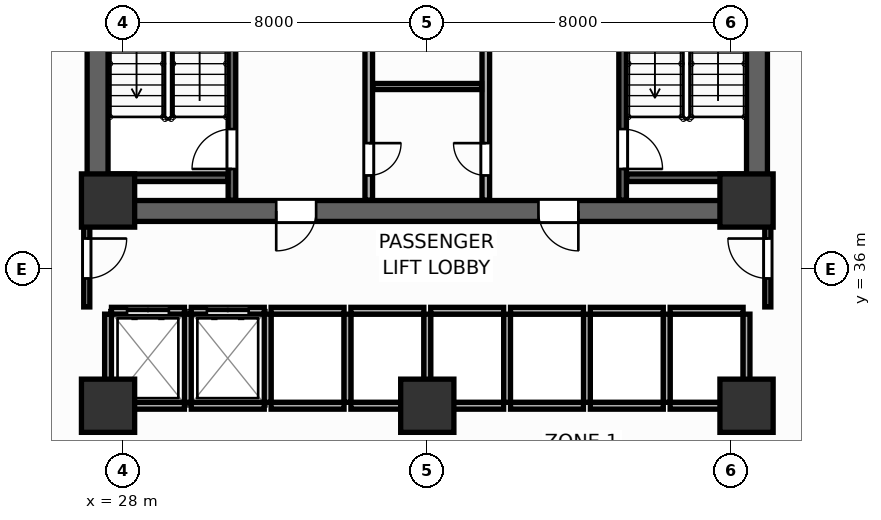
"""IFC4 building model, lengths in metres.
Left out: names, types, materials, properties, quantities, classifications, styles, units other than length and angle.
Written with IfcOpenShell. Run it as: python <this file> out.ifc"""

import sys

from ifc_helpers import new_model, si_unit, direction, frame, frame_2d, origin, origin_2d, place, context, subcontext, project, spatial, rectangle, extrude, source, transform, mapped, element, fill, save


model = new_model("IFC4")
c1 = context("Model", 3, precision=1e-05, world=origin(), true_north=direction((0.0, 1.0)))
c2 = subcontext(c1, "Body", "Model", "MODEL_VIEW")
j1 = project(units=[si_unit("LENGTHUNIT", "METRE"), si_unit("PLANEANGLEUNIT", "RADIAN")], contexts=[c1])
p1 = place(None, origin())
s1 = spatial("IfcSite", under=j1, at=p1, CompositionType="ELEMENT")
p2 = place(p1, origin())
s2 = spatial("IfcBuilding", under=s1, at=p2, CompositionType="ELEMENT")
p3 = place(p2, frame((0.0, 0.0, 63.9)))
s3 = spatial("IfcBuildingStorey", under=s2, at=p3, CompositionType="ELEMENT", Elevation=63.9)
p4 = place(p3, frame((27.05, 37.525, 0.0), z_axis=(0.0, 0.0, 1.0), x_axis=(1.0, 0.0, 0.0)))
e1 = element("IfcWall", 1, at=p4, inside=s3, PredefinedType="SHEAR", context=c2, shape_type="SweptSolid", body=[
    extrude(rectangle(XDim=17.9, YDim=0.55, at=frame_2d((8.95, 0.0))), origin(), (0.0, 0.0, 1.0), 3.9),
])
p5 = place(p4, frame((4.975, 0.0, 0.0)))
e2 = element("IfcOpeningElement", 2, at=p5, cuts=e1, PredefinedType="OPENING", context=c2, shape_type="SweptSolid", body=[
    extrude(rectangle(XDim=1.05, YDim=2.1, at=frame_2d((0.525, 1.05))), frame((0.0, 0.285, 0.0), z_axis=(0.0, -1.0, 0.0), x_axis=(1.0, 0.0, 0.0)), (0.0, 0.0, 1.0), 0.57),
])
p6 = place(p4, frame((11.875, 0.0, 0.0)))
e3 = element("IfcOpeningElement", 3, at=p6, cuts=e1, PredefinedType="OPENING", context=c2, shape_type="SweptSolid", body=[
    extrude(rectangle(XDim=1.05, YDim=2.1, at=frame_2d((0.525, 1.05))), frame((0.0, 0.285, 0.0), z_axis=(0.0, -1.0, 0.0), x_axis=(1.0, 0.0, 0.0)), (0.0, 0.0, 1.0), 0.57),
])
for number, where, z_axis, x_axis in (
    (4, (27.325, 37.8, 0.0), (0.0, 0.0, 1.0), (0.0, 1.0, 0.0)),
    (5, (44.675, 37.8, 0.0), (0.0, 0.0, 1.0), (0.0, 1.0, 0.0)),
):
    element("IfcWall", number, at=place(p3, frame(where, z_axis=z_axis, x_axis=x_axis)), inside=s3, PredefinedType="SHEAR", context=c2, shape_type="SweptSolid", body=[
        extrude(rectangle(XDim=9.0, YDim=0.55, at=frame_2d((4.5, 0.0))), origin(), (0.0, 0.0, 1.0), 3.9),
    ])
m1 = source(origin(), c2, "Body", "SweptSolid", [
    extrude(rectangle(XDim=1.4, YDim=1.4, at=origin_2d()), origin(), (0.0, 0.0, 1.0), 3.9),
])
for number, where, z_axis, x_axis in (
    (6, (27.6, 37.8, 0.0), (0.0, 0.0, 1.0), (1.0, 0.0, 0.0)),
    (7, (44.4, 37.8, 0.0), (0.0, 0.0, 1.0), (1.0, 0.0, 0.0)),
    (8, (27.6, 32.4, 0.0), (0.0, 0.0, 1.0), (1.0, 0.0, 0.0)),
    (9, (44.4, 32.4, 0.0), (0.0, 0.0, 1.0), (1.0, 0.0, 0.0)),
    (10, (36.0, 32.4, 0.0), (0.0, 0.0, 1.0), (1.0, 0.0, 0.0)),
):
    element("IfcColumn", number, at=place(p3, frame(where, z_axis=z_axis, x_axis=x_axis)), inside=s3, PredefinedType="COLUMN", context=c2, shape_type="MappedRepresentation", body=[
        mapped(m1, transform((0.0, 0.0, 0.0), scale=1.0)),
    ])
p7 = place(p3, frame((30.86, 37.81, 0.0), z_axis=(0.0, 0.0, 1.0), x_axis=(0.0, 1.0, 0.0)))
e11 = element("IfcWall", 11, at=p7, inside=s3, PredefinedType="SHEAR", context=c2, shape_type="SweptSolid", body=[
    extrude(rectangle(XDim=8.98, YDim=0.2, at=frame_2d((4.49, 0.0))), origin(), (0.0, 0.0, 1.0), 3.9),
])
p8 = place(p7, frame((0.82, 0.0, 0.0)))
e12 = element("IfcOpeningElement", 12, at=p8, cuts=e11, PredefinedType="OPENING", context=c2, shape_type="SweptSolid", body=[
    extrude(rectangle(XDim=1.05, YDim=2.1, at=frame_2d((0.525, 1.05))), frame((0.0, 0.11, 0.0), z_axis=(0.0, -1.0, 0.0), x_axis=(1.0, 0.0, 0.0)), (0.0, 0.0, 1.0), 0.22),
])
p9 = place(p3, frame((27.61, 38.4, 0.0), z_axis=(0.0, 0.0, 1.0), x_axis=(1.0, 0.0, 0.0)))
e13 = element("IfcWall", 13, at=p9, inside=s3, PredefinedType="SHEAR", context=c2, shape_type="SweptSolid", body=[
    extrude(rectangle(XDim=3.14, YDim=0.2, at=frame_2d((1.57, 0.0))), origin(), (0.0, 0.0, 1.0), 3.9),
])
p10 = place(p3, frame((41.14, 37.81, 0.0), z_axis=(0.0, 0.0, 1.0), x_axis=(0.0, 1.0, 0.0)))
e14 = element("IfcWall", 14, at=p10, inside=s3, PredefinedType="SHEAR", context=c2, shape_type="SweptSolid", body=[
    extrude(rectangle(XDim=8.98, YDim=0.2, at=frame_2d((4.49, 0.0))), origin(), (0.0, 0.0, 1.0), 3.9),
])
p11 = place(p10, frame((0.82, 0.0, 0.0)))
e15 = element("IfcOpeningElement", 15, at=p11, cuts=e14, PredefinedType="OPENING", context=c2, shape_type="SweptSolid", body=[
    extrude(rectangle(XDim=1.05, YDim=2.1, at=frame_2d((0.525, 1.05))), frame((0.0, 0.11, 0.0), z_axis=(0.0, -1.0, 0.0), x_axis=(1.0, 0.0, 0.0)), (0.0, 0.0, 1.0), 0.22),
])
p12 = place(p3, frame((41.25, 38.4, 0.0), z_axis=(0.0, 0.0, 1.0), x_axis=(1.0, 0.0, 0.0)))
e16 = element("IfcWall", 16, at=p12, inside=s3, PredefinedType="SHEAR", context=c2, shape_type="SweptSolid", body=[
    extrude(rectangle(XDim=3.14, YDim=0.2, at=frame_2d((1.57, 0.0))), origin(), (0.0, 0.0, 1.0), 3.9),
])
p13 = place(p3, frame((34.46, 37.81, 0.0), z_axis=(0.0, 0.0, 1.0), x_axis=(0.0, 1.0, 0.0)))
e17 = element("IfcWall", 17, at=p13, inside=s3, PredefinedType="PARTITIONING", context=c2, shape_type="SweptSolid", body=[
    extrude(rectangle(XDim=8.98, YDim=0.2, at=frame_2d((4.49, 0.0))), origin(), (0.0, 0.0, 1.0), 3.68),
])
p14 = place(p13, frame((0.65, 0.0, 0.0)))
e18 = element("IfcOpeningElement", 18, at=p14, cuts=e17, PredefinedType="OPENING", context=c2, shape_type="SweptSolid", body=[
    extrude(rectangle(XDim=0.85, YDim=2.05, at=frame_2d((0.425, 1.025))), frame((0.0, 0.11, 0.0), z_axis=(0.0, -1.0, 0.0), x_axis=(1.0, 0.0, 0.0)), (0.0, 0.0, 1.0), 0.22),
])
p15 = place(p3, frame((37.54, 37.81, 0.0), z_axis=(0.0, 0.0, 1.0), x_axis=(0.0, 1.0, 0.0)))
e19 = element("IfcWall", 19, at=p15, inside=s3, PredefinedType="PARTITIONING", context=c2, shape_type="SweptSolid", body=[
    extrude(rectangle(XDim=8.98, YDim=0.2, at=frame_2d((4.49, 0.0))), origin(), (0.0, 0.0, 1.0), 3.68),
])
p16 = place(p15, frame((0.65, 0.0, 0.0)))
e20 = element("IfcOpeningElement", 20, at=p16, cuts=e19, PredefinedType="OPENING", context=c2, shape_type="SweptSolid", body=[
    extrude(rectangle(XDim=0.85, YDim=2.05, at=frame_2d((0.425, 1.025))), frame((0.0, 0.11, 0.0), z_axis=(0.0, -1.0, 0.0), x_axis=(1.0, 0.0, 0.0)), (0.0, 0.0, 1.0), 0.22),
])
p17 = place(p3, frame((34.57, 40.8, 0.0), z_axis=(0.0, 0.0, 1.0), x_axis=(1.0, 0.0, 0.0)))
e21 = element("IfcWall", 21, at=p17, inside=s3, PredefinedType="PARTITIONING", context=c2, shape_type="SweptSolid", body=[
    extrude(rectangle(XDim=2.86, YDim=0.16, at=frame_2d((1.43, 0.0))), origin(), (0.0, 0.0, 1.0), 3.68),
])
p18 = place(p3, frame((27.69, 34.9, 0.0), z_axis=(0.0, 0.0, 1.0), x_axis=(1.0, 0.0, 0.0)))
e22 = element("IfcWall", 22, at=p18, inside=s3, PredefinedType="PARTITIONING", context=c2, shape_type="SweptSolid", body=[
    extrude(rectangle(XDim=1.92, YDim=0.18, at=frame_2d((0.96, 0.0))), origin(), (0.0, 0.0, 1.0), 3.68),
])
p19 = place(p18, frame((0.41, 0.0, 0.0)))
e23 = element("IfcOpeningElement", 23, at=p19, cuts=e22, PredefinedType="OPENING", context=c2, shape_type="SweptSolid", body=[
    extrude(rectangle(XDim=1.1, YDim=2.1, at=frame_2d((0.55, 1.05))), frame((0.0, 0.1, 0.0), z_axis=(0.0, -1.0, 0.0), x_axis=(1.0, 0.0, 0.0)), (0.0, 0.0, 1.0), 0.2),
])
p20 = place(p3, frame((27.69, 32.4, 0.0), z_axis=(0.0, 0.0, 1.0), x_axis=(1.0, 0.0, 0.0)))
e24 = element("IfcWall", 24, at=p20, inside=s3, PredefinedType="PARTITIONING", context=c2, shape_type="SweptSolid", body=[
    extrude(rectangle(XDim=1.92, YDim=0.18, at=frame_2d((0.96, 0.0))), origin(), (0.0, 0.0, 1.0), 3.18),
])
p21 = place(p3, frame((27.6, 32.49, 0.0), z_axis=(0.0, 0.0, 1.0), x_axis=(0.0, 1.0, 0.0)))
e25 = element("IfcWall", 25, at=p21, inside=s3, PredefinedType="PARTITIONING", context=c2, shape_type="SweptSolid", body=[
    extrude(rectangle(XDim=2.32, YDim=0.18, at=frame_2d((1.16, 0.0))), origin(), (0.0, 0.0, 1.0), 3.68),
])
p22 = place(p3, frame((29.79, 34.9, 0.0), z_axis=(0.0, 0.0, 1.0), x_axis=(1.0, 0.0, 0.0)))
e26 = element("IfcWall", 26, at=p22, inside=s3, PredefinedType="PARTITIONING", context=c2, shape_type="SweptSolid", body=[
    extrude(rectangle(XDim=1.92, YDim=0.18, at=frame_2d((0.96, 0.0))), origin(), (0.0, 0.0, 1.0), 3.68),
])
p23 = place(p22, frame((0.41, 0.0, 0.0)))
e27 = element("IfcOpeningElement", 27, at=p23, cuts=e26, PredefinedType="OPENING", context=c2, shape_type="SweptSolid", body=[
    extrude(rectangle(XDim=1.1, YDim=2.1, at=frame_2d((0.55, 1.05))), frame((0.0, 0.1, 0.0), z_axis=(0.0, -1.0, 0.0), x_axis=(1.0, 0.0, 0.0)), (0.0, 0.0, 1.0), 0.2),
])
p24 = place(p3, frame((29.79, 32.4, 0.0), z_axis=(0.0, 0.0, 1.0), x_axis=(1.0, 0.0, 0.0)))
e28 = element("IfcWall", 28, at=p24, inside=s3, PredefinedType="PARTITIONING", context=c2, shape_type="SweptSolid", body=[
    extrude(rectangle(XDim=1.92, YDim=0.18, at=frame_2d((0.96, 0.0))), origin(), (0.0, 0.0, 1.0), 3.18),
])
p25 = place(p3, frame((29.7, 32.49, 0.0), z_axis=(0.0, 0.0, 1.0), x_axis=(0.0, 1.0, 0.0)))
e29 = element("IfcWall", 29, at=p25, inside=s3, PredefinedType="PARTITIONING", context=c2, shape_type="SweptSolid", body=[
    extrude(rectangle(XDim=2.32, YDim=0.18, at=frame_2d((1.16, 0.0))), origin(), (0.0, 0.0, 1.0), 3.68),
])
p26 = place(p3, frame((31.89, 34.9, 0.0), z_axis=(0.0, 0.0, 1.0), x_axis=(1.0, 0.0, 0.0)))
e30 = element("IfcWall", 30, at=p26, inside=s3, PredefinedType="PARTITIONING", context=c2, shape_type="SweptSolid", body=[
    extrude(rectangle(XDim=1.92, YDim=0.18, at=frame_2d((0.96, 0.0))), origin(), (0.0, 0.0, 1.0), 3.68),
])
p27 = place(p3, frame((31.89, 32.4, 0.0), z_axis=(0.0, 0.0, 1.0), x_axis=(1.0, 0.0, 0.0)))
e31 = element("IfcWall", 31, at=p27, inside=s3, PredefinedType="PARTITIONING", context=c2, shape_type="SweptSolid", body=[
    extrude(rectangle(XDim=1.92, YDim=0.18, at=frame_2d((0.96, 0.0))), origin(), (0.0, 0.0, 1.0), 3.18),
])
p28 = place(p3, frame((31.8, 32.49, 0.0), z_axis=(0.0, 0.0, 1.0), x_axis=(0.0, 1.0, 0.0)))
e32 = element("IfcWall", 32, at=p28, inside=s3, PredefinedType="PARTITIONING", context=c2, shape_type="SweptSolid", body=[
    extrude(rectangle(XDim=2.32, YDim=0.18, at=frame_2d((1.16, 0.0))), origin(), (0.0, 0.0, 1.0), 3.68),
])
p29 = place(p3, frame((33.99, 34.9, 0.0), z_axis=(0.0, 0.0, 1.0), x_axis=(1.0, 0.0, 0.0)))
e33 = element("IfcWall", 33, at=p29, inside=s3, PredefinedType="PARTITIONING", context=c2, shape_type="SweptSolid", body=[
    extrude(rectangle(XDim=1.92, YDim=0.18, at=frame_2d((0.96, 0.0))), origin(), (0.0, 0.0, 1.0), 3.68),
])
p30 = place(p3, frame((33.99, 32.4, 0.0), z_axis=(0.0, 0.0, 1.0), x_axis=(1.0, 0.0, 0.0)))
e34 = element("IfcWall", 34, at=p30, inside=s3, PredefinedType="PARTITIONING", context=c2, shape_type="SweptSolid", body=[
    extrude(rectangle(XDim=1.92, YDim=0.18, at=frame_2d((0.96, 0.0))), origin(), (0.0, 0.0, 1.0), 3.18),
])
p31 = place(p3, frame((33.9, 32.49, 0.0), z_axis=(0.0, 0.0, 1.0), x_axis=(0.0, 1.0, 0.0)))
e35 = element("IfcWall", 35, at=p31, inside=s3, PredefinedType="PARTITIONING", context=c2, shape_type="SweptSolid", body=[
    extrude(rectangle(XDim=2.32, YDim=0.18, at=frame_2d((1.16, 0.0))), origin(), (0.0, 0.0, 1.0), 3.68),
])
p32 = place(p3, frame((36.09, 34.9, 0.0), z_axis=(0.0, 0.0, 1.0), x_axis=(1.0, 0.0, 0.0)))
e36 = element("IfcWall", 36, at=p32, inside=s3, PredefinedType="PARTITIONING", context=c2, shape_type="SweptSolid", body=[
    extrude(rectangle(XDim=1.92, YDim=0.18, at=frame_2d((0.96, 0.0))), origin(), (0.0, 0.0, 1.0), 3.68),
])
p33 = place(p3, frame((36.09, 32.4, 0.0), z_axis=(0.0, 0.0, 1.0), x_axis=(1.0, 0.0, 0.0)))
e37 = element("IfcWall", 37, at=p33, inside=s3, PredefinedType="PARTITIONING", context=c2, shape_type="SweptSolid", body=[
    extrude(rectangle(XDim=1.92, YDim=0.18, at=frame_2d((0.96, 0.0))), origin(), (0.0, 0.0, 1.0), 3.18),
])
p34 = place(p3, frame((36.0, 32.49, 0.0), z_axis=(0.0, 0.0, 1.0), x_axis=(0.0, 1.0, 0.0)))
e38 = element("IfcWall", 38, at=p34, inside=s3, PredefinedType="PARTITIONING", context=c2, shape_type="SweptSolid", body=[
    extrude(rectangle(XDim=2.32, YDim=0.18, at=frame_2d((1.16, 0.0))), origin(), (0.0, 0.0, 1.0), 3.68),
])
p35 = place(p3, frame((38.19, 34.9, 0.0), z_axis=(0.0, 0.0, 1.0), x_axis=(1.0, 0.0, 0.0)))
e39 = element("IfcWall", 39, at=p35, inside=s3, PredefinedType="PARTITIONING", context=c2, shape_type="SweptSolid", body=[
    extrude(rectangle(XDim=1.92, YDim=0.18, at=frame_2d((0.96, 0.0))), origin(), (0.0, 0.0, 1.0), 3.68),
])
p36 = place(p3, frame((38.19, 32.4, 0.0), z_axis=(0.0, 0.0, 1.0), x_axis=(1.0, 0.0, 0.0)))
e40 = element("IfcWall", 40, at=p36, inside=s3, PredefinedType="PARTITIONING", context=c2, shape_type="SweptSolid", body=[
    extrude(rectangle(XDim=1.92, YDim=0.18, at=frame_2d((0.96, 0.0))), origin(), (0.0, 0.0, 1.0), 3.18),
])
p37 = place(p3, frame((38.1, 32.49, 0.0), z_axis=(0.0, 0.0, 1.0), x_axis=(0.0, 1.0, 0.0)))
e41 = element("IfcWall", 41, at=p37, inside=s3, PredefinedType="PARTITIONING", context=c2, shape_type="SweptSolid", body=[
    extrude(rectangle(XDim=2.32, YDim=0.18, at=frame_2d((1.16, 0.0))), origin(), (0.0, 0.0, 1.0), 3.68),
])
p38 = place(p3, frame((40.29, 34.9, 0.0), z_axis=(0.0, 0.0, 1.0), x_axis=(1.0, 0.0, 0.0)))
e42 = element("IfcWall", 42, at=p38, inside=s3, PredefinedType="PARTITIONING", context=c2, shape_type="SweptSolid", body=[
    extrude(rectangle(XDim=1.92, YDim=0.18, at=frame_2d((0.96, 0.0))), origin(), (0.0, 0.0, 1.0), 3.68),
])
p39 = place(p3, frame((40.29, 32.4, 0.0), z_axis=(0.0, 0.0, 1.0), x_axis=(1.0, 0.0, 0.0)))
e43 = element("IfcWall", 43, at=p39, inside=s3, PredefinedType="PARTITIONING", context=c2, shape_type="SweptSolid", body=[
    extrude(rectangle(XDim=1.92, YDim=0.18, at=frame_2d((0.96, 0.0))), origin(), (0.0, 0.0, 1.0), 3.18),
])
p40 = place(p3, frame((40.2, 32.49, 0.0), z_axis=(0.0, 0.0, 1.0), x_axis=(0.0, 1.0, 0.0)))
e44 = element("IfcWall", 44, at=p40, inside=s3, PredefinedType="PARTITIONING", context=c2, shape_type="SweptSolid", body=[
    extrude(rectangle(XDim=2.32, YDim=0.18, at=frame_2d((1.16, 0.0))), origin(), (0.0, 0.0, 1.0), 3.68),
])
p41 = place(p3, frame((42.39, 34.9, 0.0), z_axis=(0.0, 0.0, 1.0), x_axis=(1.0, 0.0, 0.0)))
e45 = element("IfcWall", 45, at=p41, inside=s3, PredefinedType="PARTITIONING", context=c2, shape_type="SweptSolid", body=[
    extrude(rectangle(XDim=1.92, YDim=0.18, at=frame_2d((0.96, 0.0))), origin(), (0.0, 0.0, 1.0), 3.68),
])
p42 = place(p3, frame((42.39, 32.4, 0.0), z_axis=(0.0, 0.0, 1.0), x_axis=(1.0, 0.0, 0.0)))
e46 = element("IfcWall", 46, at=p42, inside=s3, PredefinedType="PARTITIONING", context=c2, shape_type="SweptSolid", body=[
    extrude(rectangle(XDim=1.92, YDim=0.18, at=frame_2d((0.96, 0.0))), origin(), (0.0, 0.0, 1.0), 3.18),
])
for number, where, z_axis, x_axis in (
    (47, (42.3, 32.49, 0.0), (0.0, 0.0, 1.0), (0.0, 1.0, 0.0)),
    (48, (44.4, 32.49, 0.0), (0.0, 0.0, 1.0), (0.0, 1.0, 0.0)),
):
    element("IfcWall", number, at=place(p3, frame(where, z_axis=z_axis, x_axis=x_axis)), inside=s3, PredefinedType="PARTITIONING", context=c2, shape_type="SweptSolid", body=[
        extrude(rectangle(XDim=2.32, YDim=0.18, at=frame_2d((1.16, 0.0))), origin(), (0.0, 0.0, 1.0), 3.68),
    ])
p43 = place(p3, frame((27.04, 35.0, 0.0), z_axis=(0.0, 0.0, 1.0), x_axis=(0.0, 1.0, 0.0)))
e49 = element("IfcWall", 49, at=p43, inside=s3, PredefinedType="PARTITIONING", context=c2, shape_type="SweptSolid", body=[
    extrude(rectangle(XDim=2.65, YDim=0.16, at=frame_2d((1.325, 0.0))), origin(), (0.0, 0.0, 1.0), 3.68),
])
p44 = place(p43, frame((0.75, 0.0, 0.0)))
e50 = element("IfcOpeningElement", 50, at=p44, cuts=e49, PredefinedType="OPENING", context=c2, shape_type="SweptSolid", body=[
    extrude(rectangle(XDim=1.05, YDim=2.1, at=frame_2d((0.525, 1.05))), frame((0.0, 0.09, 0.0), z_axis=(0.0, -1.0, 0.0), x_axis=(1.0, 0.0, 0.0)), (0.0, 0.0, 1.0), 0.18),
])
p45 = place(p3, frame((44.96, 35.0, 0.0), z_axis=(0.0, 0.0, 1.0), x_axis=(0.0, 1.0, 0.0)))
e51 = element("IfcWall", 51, at=p45, inside=s3, PredefinedType="PARTITIONING", context=c2, shape_type="SweptSolid", body=[
    extrude(rectangle(XDim=2.65, YDim=0.16, at=frame_2d((1.325, 0.0))), origin(), (0.0, 0.0, 1.0), 3.68),
])
p46 = place(p45, frame((0.75, 0.0, 0.0)))
e52 = element("IfcOpeningElement", 52, at=p46, cuts=e51, PredefinedType="OPENING", context=c2, shape_type="SweptSolid", body=[
    extrude(rectangle(XDim=1.05, YDim=2.1, at=frame_2d((0.525, 1.05))), frame((0.0, 0.09, 0.0), z_axis=(0.0, -1.0, 0.0), x_axis=(1.0, 0.0, 0.0)), (0.0, 0.0, 1.0), 0.18),
])
p47 = place(p8, origin())
e53 = element("IfcDoor", 53, at=p47, inside=s3, OperationType="SINGLE_SWING_LEFT", PredefinedType="DOOR", context=c2, shape_type="SweptSolid", body=[
    extrude(rectangle(XDim=1.05, YDim=2.1, at=frame_2d((0.525, 1.05))), frame((0.0, 0.025, 0.0), z_axis=(0.0, -1.0, 0.0), x_axis=(1.0, 0.0, 0.0)), (0.0, 0.0, 1.0), 0.05),
])
fill(e12, e53)
p48 = place(p11, frame((1.05, 0.0, 0.0), z_axis=(0.0, 0.0, 1.0), x_axis=(-1.0, 0.0, 0.0)))
e54 = element("IfcDoor", 54, at=p48, inside=s3, OperationType="SINGLE_SWING_RIGHT", PredefinedType="DOOR", context=c2, shape_type="SweptSolid", body=[
    extrude(rectangle(XDim=1.05, YDim=2.1, at=frame_2d((0.525, 1.05))), frame((0.0, 0.025, 0.0), z_axis=(0.0, -1.0, 0.0), x_axis=(1.0, 0.0, 0.0)), (0.0, 0.0, 1.0), 0.05),
])
fill(e15, e54)
p49 = place(p14, frame((0.85, 0.0, 0.0), z_axis=(0.0, 0.0, 1.0), x_axis=(-1.0, 0.0, 0.0)))
e55 = element("IfcDoor", 55, at=p49, inside=s3, OperationType="SINGLE_SWING_LEFT", PredefinedType="DOOR", context=c2, shape_type="SweptSolid", body=[
    extrude(rectangle(XDim=0.85, YDim=2.05, at=frame_2d((0.425, 1.025))), frame((0.0, 0.025, 0.0), z_axis=(0.0, -1.0, 0.0), x_axis=(1.0, 0.0, 0.0)), (0.0, 0.0, 1.0), 0.05),
])
fill(e18, e55)
p50 = place(p16, origin())
e56 = element("IfcDoor", 56, at=p50, inside=s3, OperationType="SINGLE_SWING_RIGHT", PredefinedType="DOOR", context=c2, shape_type="SweptSolid", body=[
    extrude(rectangle(XDim=0.85, YDim=2.05, at=frame_2d((0.425, 1.025))), frame((0.0, 0.025, 0.0), z_axis=(0.0, -1.0, 0.0), x_axis=(1.0, 0.0, 0.0)), (0.0, 0.0, 1.0), 0.05),
])
fill(e20, e56)
p51 = place(p19, origin())
e57 = element("IfcDoor", 57, at=p51, inside=s3, OperationType="DOUBLE_DOOR_SLIDING", PredefinedType="DOOR", context=c2, shape_type="SweptSolid", body=[
    extrude(rectangle(XDim=1.1, YDim=2.1, at=frame_2d((0.55, 1.05))), frame((0.0, 0.025, 0.0), z_axis=(0.0, -1.0, 0.0), x_axis=(1.0, 0.0, 0.0)), (0.0, 0.0, 1.0), 0.05),
])
fill(e23, e57)
p52 = place(p23, origin())
e58 = element("IfcDoor", 58, at=p52, inside=s3, OperationType="DOUBLE_DOOR_SLIDING", PredefinedType="DOOR", context=c2, shape_type="SweptSolid", body=[
    extrude(rectangle(XDim=1.1, YDim=2.1, at=frame_2d((0.55, 1.05))), frame((0.0, 0.025, 0.0), z_axis=(0.0, -1.0, 0.0), x_axis=(1.0, 0.0, 0.0)), (0.0, 0.0, 1.0), 0.05),
])
fill(e27, e58)
p53 = place(p44, frame((1.05, 0.0, 0.0), z_axis=(0.0, 0.0, 1.0), x_axis=(-1.0, 0.0, 0.0)))
e59 = element("IfcDoor", 59, at=p53, inside=s3, OperationType="SINGLE_SWING_LEFT", PredefinedType="DOOR", context=c2, shape_type="SweptSolid", body=[
    extrude(rectangle(XDim=1.05, YDim=2.1, at=frame_2d((0.525, 1.05))), frame((0.0, 0.025, 0.0), z_axis=(0.0, -1.0, 0.0), x_axis=(1.0, 0.0, 0.0)), (0.0, 0.0, 1.0), 0.05),
])
fill(e50, e59)
p54 = place(p46, origin())
e60 = element("IfcDoor", 60, at=p54, inside=s3, OperationType="SINGLE_SWING_RIGHT", PredefinedType="DOOR", context=c2, shape_type="SweptSolid", body=[
    extrude(rectangle(XDim=1.05, YDim=2.1, at=frame_2d((0.525, 1.05))), frame((0.0, 0.025, 0.0), z_axis=(0.0, -1.0, 0.0), x_axis=(1.0, 0.0, 0.0)), (0.0, 0.0, 1.0), 0.05),
])
fill(e52, e60)
p55 = place(p5, frame((1.05, 0.0, 0.0), z_axis=(0.0, 0.0, 1.0), x_axis=(-1.0, 0.0, 0.0)))
e61 = element("IfcDoor", 61, at=p55, inside=s3, OperationType="SINGLE_SWING_RIGHT", PredefinedType="DOOR", context=c2, shape_type="SweptSolid", body=[
    extrude(rectangle(XDim=1.05, YDim=2.1, at=frame_2d((0.525, 1.05))), frame((0.0, 0.025, 0.0), z_axis=(0.0, -1.0, 0.0), x_axis=(1.0, 0.0, 0.0)), (0.0, 0.0, 1.0), 0.05),
])
fill(e2, e61)
p56 = place(p6, frame((1.05, 0.0, 0.0), z_axis=(0.0, 0.0, 1.0), x_axis=(-1.0, 0.0, 0.0)))
e62 = element("IfcDoor", 62, at=p56, inside=s3, OperationType="SINGLE_SWING_LEFT", PredefinedType="DOOR", context=c2, shape_type="SweptSolid", body=[
    extrude(rectangle(XDim=1.05, YDim=2.1, at=frame_2d((0.525, 1.05))), frame((0.0, 0.025, 0.0), z_axis=(0.0, -1.0, 0.0), x_axis=(1.0, 0.0, 0.0)), (0.0, 0.0, 1.0), 0.05),
])
fill(e3, e62)
save(model, sys.argv[1])
